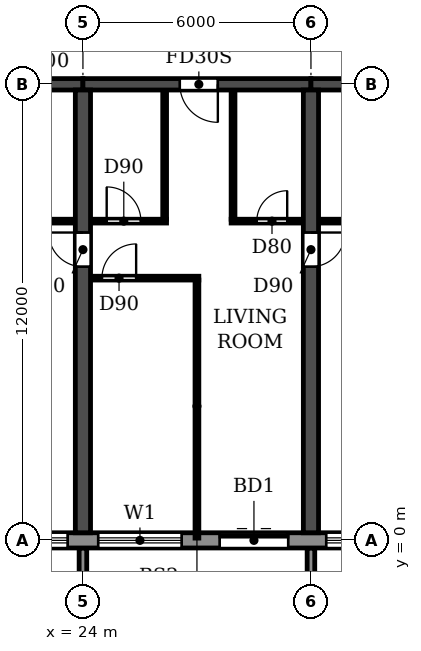
"""IFC4 building model, lengths in metres.
Left out: names, types, materials, properties, quantities, classifications, styles, units other than length and angle.
Written with IfcOpenShell. Run it as: python <this file> out.ifc"""

import sys

from ifc_helpers import new_model, si_unit, direction, frame, frame_2d, origin, place, context, subcontext, project, spatial, polyline, rectangle, outline, extrude, source, transform, mapped, element, fill, save


model = new_model("IFC4")
c1 = context("Model", 3, precision=1e-05, world=origin(), true_north=direction((0.0, 1.0)))
c2 = subcontext(c1, "Body", "Model", "MODEL_VIEW")
j1 = project(units=[si_unit("LENGTHUNIT", "METRE"), si_unit("PLANEANGLEUNIT", "RADIAN")], contexts=[c1])
p1 = place(None, origin())
s1 = spatial("IfcSite", under=j1, at=p1, CompositionType="ELEMENT")
p2 = place(p1, origin())
s2 = spatial("IfcBuilding", under=s1, at=p2, CompositionType="ELEMENT")
p3 = place(p2, frame((0.0, 0.0, 63.0)))
s3 = spatial("IfcBuildingStorey", under=s2, at=p3, CompositionType="ELEMENT", Elevation=63.0)
p4 = place(p3, frame((24.0, 0.2, 0.0), z_axis=(0.0, 0.0, 1.0), x_axis=(0.0, 1.0, 0.0)))
e1 = element("IfcWall", 1, at=p4, inside=s3, PredefinedType="SHEAR", context=c2, shape_type="SweptSolid", body=[
    extrude(rectangle(XDim=11.65, YDim=0.4, at=frame_2d((5.825, 0.0))), origin(), (0.0, 0.0, 1.0), 2.95),
])
p5 = place(p4, frame((7.0, 0.0, 0.0)))
e2 = element("IfcOpeningElement", 2, at=p5, cuts=e1, PredefinedType="OPENING", context=c2, shape_type="SweptSolid", body=[
    extrude(rectangle(XDim=0.9, YDim=2.1, at=frame_2d((0.45, 1.05))), frame((0.0, 0.21, 0.0), z_axis=(0.0, -1.0, 0.0), x_axis=(1.0, 0.0, 0.0)), (0.0, 0.0, 1.0), 0.42),
])
p6 = place(p3, frame((30.0, 0.2, 0.0), z_axis=(0.0, 0.0, 1.0), x_axis=(0.0, 1.0, 0.0)))
e3 = element("IfcWall", 3, at=p6, inside=s3, PredefinedType="SHEAR", context=c2, shape_type="SweptSolid", body=[
    extrude(rectangle(XDim=11.65, YDim=0.4, at=frame_2d((5.825, 0.0))), origin(), (0.0, 0.0, 1.0), 2.95),
])
p7 = place(p6, frame((7.0, 0.0, 0.0)))
e4 = element("IfcOpeningElement", 4, at=p7, cuts=e3, PredefinedType="OPENING", context=c2, shape_type="SweptSolid", body=[
    extrude(rectangle(XDim=0.9, YDim=2.1, at=frame_2d((0.45, 1.05))), frame((0.0, 0.21, 0.0), z_axis=(0.0, -1.0, 0.0), x_axis=(1.0, 0.0, 0.0)), (0.0, 0.0, 1.0), 0.42),
])
p8 = place(p3, frame((18.0, 12.0, 0.0), z_axis=(0.0, 0.0, 1.0), x_axis=(1.0, 0.0, 0.0)))
e5 = element("IfcWall", 5, at=p8, inside=s3, PredefinedType="SHEAR", context=c2, shape_type="SweptSolid", body=[
    extrude(rectangle(XDim=6.0, YDim=0.3, at=frame_2d((3.0, 0.0))), origin(), (0.0, 0.0, 1.0), 2.35),
])
p9 = place(p3, frame((24.0, 12.0, 0.0), z_axis=(0.0, 0.0, 1.0), x_axis=(1.0, 0.0, 0.0)))
e6 = element("IfcWall", 6, at=p9, inside=s3, PredefinedType="SHEAR", context=c2, shape_type="SweptSolid", body=[
    extrude(rectangle(XDim=6.0, YDim=0.3, at=frame_2d((3.0, 0.0))), origin(), (0.0, 0.0, 1.0), 2.35),
])
p10 = place(p9, frame((2.55, 0.0, 0.0)))
e7 = element("IfcOpeningElement", 7, at=p10, cuts=e6, PredefinedType="OPENING", context=c2, shape_type="SweptSolid", body=[
    extrude(rectangle(XDim=1.0, YDim=2.1, at=frame_2d((0.5, 1.05))), frame((0.0, 0.16, 0.0), z_axis=(0.0, -1.0, 0.0), x_axis=(1.0, 0.0, 0.0)), (0.0, 0.0, 1.0), 0.32),
])
p11 = place(p3, frame((30.0, 12.0, 0.0), z_axis=(0.0, 0.0, 1.0), x_axis=(1.0, 0.0, 0.0)))
e8 = element("IfcWall", 8, at=p11, inside=s3, PredefinedType="SHEAR", context=c2, shape_type="SweptSolid", body=[
    extrude(rectangle(XDim=6.0, YDim=0.3, at=frame_2d((3.0, 0.0))), origin(), (0.0, 0.0, 1.0), 2.35),
])
p12 = place(p3, frame((10.683, 0.0, 0.0), z_axis=(0.0, 0.0, 1.0), x_axis=(1.0, 0.0, 0.0)))
e9 = element("IfcWall", 9, at=p12, inside=s3, PredefinedType="STANDARD", context=c2, shape_type="SweptSolid", body=[
    extrude(rectangle(XDim=80.634, YDim=0.4, at=frame_2d((40.317, 0.0))), origin(), (0.0, 0.0, 1.0), 2.95),
])
p13 = place(p12, frame((1.717, 0.0, 0.9)))
e10 = element("IfcOpeningElement", 10, at=p13, cuts=e9, PredefinedType="OPENING", context=c2, shape_type="SweptSolid", body=[
    extrude(rectangle(XDim=2.2, YDim=1.5, at=frame_2d((1.1, 0.75))), frame((0.0, 0.21, 0.0), z_axis=(0.0, -1.0, 0.0), x_axis=(1.0, 0.0, 0.0)), (0.0, 0.0, 1.0), 0.42),
])
p14 = place(p12, frame((4.917, 0.0, 0.0)))
e11 = element("IfcOpeningElement", 11, at=p14, cuts=e9, PredefinedType="OPENING", context=c2, shape_type="SweptSolid", body=[
    extrude(rectangle(XDim=1.8, YDim=2.4, at=frame_2d((0.9, 1.2))), frame((0.0, 0.21, 0.0), z_axis=(0.0, -1.0, 0.0), x_axis=(1.0, 0.0, 0.0)), (0.0, 0.0, 1.0), 0.42),
])
p15 = place(p12, frame((7.717, 0.0, 0.9)))
e12 = element("IfcOpeningElement", 12, at=p15, cuts=e9, PredefinedType="OPENING", context=c2, shape_type="SweptSolid", body=[
    extrude(rectangle(XDim=2.2, YDim=1.5, at=frame_2d((1.1, 0.75))), frame((0.0, 0.21, 0.0), z_axis=(0.0, -1.0, 0.0), x_axis=(1.0, 0.0, 0.0)), (0.0, 0.0, 1.0), 0.42),
])
p16 = place(p12, frame((10.717, 0.0, 0.9)))
e13 = element("IfcOpeningElement", 13, at=p16, cuts=e9, PredefinedType="OPENING", context=c2, shape_type="SweptSolid", body=[
    extrude(rectangle(XDim=2.2, YDim=1.5, at=frame_2d((1.1, 0.75))), frame((0.0, 0.21, 0.0), z_axis=(0.0, -1.0, 0.0), x_axis=(1.0, 0.0, 0.0)), (0.0, 0.0, 1.0), 0.42),
])
p17 = place(p12, frame((13.717, 0.0, 0.9)))
e14 = element("IfcOpeningElement", 14, at=p17, cuts=e9, PredefinedType="OPENING", context=c2, shape_type="SweptSolid", body=[
    extrude(rectangle(XDim=2.2, YDim=1.5, at=frame_2d((1.1, 0.75))), frame((0.0, 0.21, 0.0), z_axis=(0.0, -1.0, 0.0), x_axis=(1.0, 0.0, 0.0)), (0.0, 0.0, 1.0), 0.42),
])
p18 = place(p12, frame((16.917, 0.0, 0.0)))
e15 = element("IfcOpeningElement", 15, at=p18, cuts=e9, PredefinedType="OPENING", context=c2, shape_type="SweptSolid", body=[
    extrude(rectangle(XDim=1.8, YDim=2.4, at=frame_2d((0.9, 1.2))), frame((0.0, 0.21, 0.0), z_axis=(0.0, -1.0, 0.0), x_axis=(1.0, 0.0, 0.0)), (0.0, 0.0, 1.0), 0.42),
])
p19 = place(p12, frame((19.717, 0.0, 0.9)))
e16 = element("IfcOpeningElement", 16, at=p19, cuts=e9, PredefinedType="OPENING", context=c2, shape_type="SweptSolid", body=[
    extrude(rectangle(XDim=2.2, YDim=1.5, at=frame_2d((1.1, 0.75))), frame((0.0, 0.21, 0.0), z_axis=(0.0, -1.0, 0.0), x_axis=(1.0, 0.0, 0.0)), (0.0, 0.0, 1.0), 0.42),
])
p20 = place(p12, frame((22.717, 0.0, 0.9)))
e17 = element("IfcOpeningElement", 17, at=p20, cuts=e9, PredefinedType="OPENING", context=c2, shape_type="SweptSolid", body=[
    extrude(rectangle(XDim=2.2, YDim=1.5, at=frame_2d((1.1, 0.75))), frame((0.0, 0.21, 0.0), z_axis=(0.0, -1.0, 0.0), x_axis=(1.0, 0.0, 0.0)), (0.0, 0.0, 1.0), 0.42),
])
p21 = place(p12, frame((25.917, 0.0, 0.0)))
e18 = element("IfcOpeningElement", 18, at=p21, cuts=e9, PredefinedType="OPENING", context=c2, shape_type="SweptSolid", body=[
    extrude(rectangle(XDim=1.8, YDim=2.4, at=frame_2d((0.9, 1.2))), frame((0.0, 0.21, 0.0), z_axis=(0.0, -1.0, 0.0), x_axis=(1.0, 0.0, 0.0)), (0.0, 0.0, 1.0), 0.42),
])
p22 = place(p12, frame((28.717, 0.0, 0.9)))
e19 = element("IfcOpeningElement", 19, at=p22, cuts=e9, PredefinedType="OPENING", context=c2, shape_type="SweptSolid", body=[
    extrude(rectangle(XDim=2.2, YDim=1.5, at=frame_2d((1.1, 0.75))), frame((0.0, 0.21, 0.0), z_axis=(0.0, -1.0, 0.0), x_axis=(1.0, 0.0, 0.0)), (0.0, 0.0, 1.0), 0.42),
])
p23 = place(p12, frame((31.717, 0.0, 0.9)))
e20 = element("IfcOpeningElement", 20, at=p23, cuts=e9, PredefinedType="OPENING", context=c2, shape_type="SweptSolid", body=[
    extrude(rectangle(XDim=2.2, YDim=1.5, at=frame_2d((1.1, 0.75))), frame((0.0, 0.21, 0.0), z_axis=(0.0, -1.0, 0.0), x_axis=(1.0, 0.0, 0.0)), (0.0, 0.0, 1.0), 0.42),
])
p24 = place(p12, frame((34.717, 0.0, 0.9)))
e21 = element("IfcOpeningElement", 21, at=p24, cuts=e9, PredefinedType="OPENING", context=c2, shape_type="SweptSolid", body=[
    extrude(rectangle(XDim=2.2, YDim=1.5, at=frame_2d((1.1, 0.75))), frame((0.0, 0.21, 0.0), z_axis=(0.0, -1.0, 0.0), x_axis=(1.0, 0.0, 0.0)), (0.0, 0.0, 1.0), 0.42),
])
p25 = place(p12, frame((37.717, 0.0, 0.9)))
e22 = element("IfcOpeningElement", 22, at=p25, cuts=e9, PredefinedType="OPENING", context=c2, shape_type="SweptSolid", body=[
    extrude(rectangle(XDim=2.2, YDim=1.5, at=frame_2d((1.1, 0.75))), frame((0.0, 0.21, 0.0), z_axis=(0.0, -1.0, 0.0), x_axis=(1.0, 0.0, 0.0)), (0.0, 0.0, 1.0), 0.42),
])
p26 = place(p12, frame((40.917, 0.0, 0.0)))
e23 = element("IfcOpeningElement", 23, at=p26, cuts=e9, PredefinedType="OPENING", context=c2, shape_type="SweptSolid", body=[
    extrude(rectangle(XDim=1.8, YDim=2.4, at=frame_2d((0.9, 1.2))), frame((0.0, 0.21, 0.0), z_axis=(0.0, -1.0, 0.0), x_axis=(1.0, 0.0, 0.0)), (0.0, 0.0, 1.0), 0.42),
])
p27 = place(p12, frame((43.717, 0.0, 0.9)))
e24 = element("IfcOpeningElement", 24, at=p27, cuts=e9, PredefinedType="OPENING", context=c2, shape_type="SweptSolid", body=[
    extrude(rectangle(XDim=2.2, YDim=1.5, at=frame_2d((1.1, 0.75))), frame((0.0, 0.21, 0.0), z_axis=(0.0, -1.0, 0.0), x_axis=(1.0, 0.0, 0.0)), (0.0, 0.0, 1.0), 0.42),
])
p28 = place(p12, frame((46.717, 0.0, 0.9)))
e25 = element("IfcOpeningElement", 25, at=p28, cuts=e9, PredefinedType="OPENING", context=c2, shape_type="SweptSolid", body=[
    extrude(rectangle(XDim=2.2, YDim=1.5, at=frame_2d((1.1, 0.75))), frame((0.0, 0.21, 0.0), z_axis=(0.0, -1.0, 0.0), x_axis=(1.0, 0.0, 0.0)), (0.0, 0.0, 1.0), 0.42),
])
p29 = place(p12, frame((49.717, 0.0, 0.9)))
e26 = element("IfcOpeningElement", 26, at=p29, cuts=e9, PredefinedType="OPENING", context=c2, shape_type="SweptSolid", body=[
    extrude(rectangle(XDim=2.2, YDim=1.5, at=frame_2d((1.1, 0.75))), frame((0.0, 0.21, 0.0), z_axis=(0.0, -1.0, 0.0), x_axis=(1.0, 0.0, 0.0)), (0.0, 0.0, 1.0), 0.42),
])
p30 = place(p12, frame((52.717, 0.0, 0.9)))
e27 = element("IfcOpeningElement", 27, at=p30, cuts=e9, PredefinedType="OPENING", context=c2, shape_type="SweptSolid", body=[
    extrude(rectangle(XDim=2.2, YDim=1.5, at=frame_2d((1.1, 0.75))), frame((0.0, 0.21, 0.0), z_axis=(0.0, -1.0, 0.0), x_axis=(1.0, 0.0, 0.0)), (0.0, 0.0, 1.0), 0.42),
])
p31 = place(p12, frame((55.717, 0.0, 0.9)))
e28 = element("IfcOpeningElement", 28, at=p31, cuts=e9, PredefinedType="OPENING", context=c2, shape_type="SweptSolid", body=[
    extrude(rectangle(XDim=2.2, YDim=1.5, at=frame_2d((1.1, 0.75))), frame((0.0, 0.21, 0.0), z_axis=(0.0, -1.0, 0.0), x_axis=(1.0, 0.0, 0.0)), (0.0, 0.0, 1.0), 0.42),
])
p32 = place(p12, frame((58.717, 0.0, 0.9)))
e29 = element("IfcOpeningElement", 29, at=p32, cuts=e9, PredefinedType="OPENING", context=c2, shape_type="SweptSolid", body=[
    extrude(rectangle(XDim=2.2, YDim=1.5, at=frame_2d((1.1, 0.75))), frame((0.0, 0.21, 0.0), z_axis=(0.0, -1.0, 0.0), x_axis=(1.0, 0.0, 0.0)), (0.0, 0.0, 1.0), 0.42),
])
p33 = place(p12, frame((61.717, 0.0, 0.9)))
e30 = element("IfcOpeningElement", 30, at=p33, cuts=e9, PredefinedType="OPENING", context=c2, shape_type="SweptSolid", body=[
    extrude(rectangle(XDim=2.2, YDim=1.5, at=frame_2d((1.1, 0.75))), frame((0.0, 0.21, 0.0), z_axis=(0.0, -1.0, 0.0), x_axis=(1.0, 0.0, 0.0)), (0.0, 0.0, 1.0), 0.42),
])
p34 = place(p12, frame((64.917, 0.0, 0.0)))
e31 = element("IfcOpeningElement", 31, at=p34, cuts=e9, PredefinedType="OPENING", context=c2, shape_type="SweptSolid", body=[
    extrude(rectangle(XDim=1.8, YDim=2.4, at=frame_2d((0.9, 1.2))), frame((0.0, 0.21, 0.0), z_axis=(0.0, -1.0, 0.0), x_axis=(1.0, 0.0, 0.0)), (0.0, 0.0, 1.0), 0.42),
])
p35 = place(p12, frame((67.717, 0.0, 0.9)))
e32 = element("IfcOpeningElement", 32, at=p35, cuts=e9, PredefinedType="OPENING", context=c2, shape_type="SweptSolid", body=[
    extrude(rectangle(XDim=2.2, YDim=1.5, at=frame_2d((1.1, 0.75))), frame((0.0, 0.21, 0.0), z_axis=(0.0, -1.0, 0.0), x_axis=(1.0, 0.0, 0.0)), (0.0, 0.0, 1.0), 0.42),
])
p36 = place(p12, frame((70.717, 0.0, 0.9)))
e33 = element("IfcOpeningElement", 33, at=p36, cuts=e9, PredefinedType="OPENING", context=c2, shape_type="SweptSolid", body=[
    extrude(rectangle(XDim=2.2, YDim=1.5, at=frame_2d((1.1, 0.75))), frame((0.0, 0.21, 0.0), z_axis=(0.0, -1.0, 0.0), x_axis=(1.0, 0.0, 0.0)), (0.0, 0.0, 1.0), 0.42),
])
p37 = place(p12, frame((73.717, 0.0, 0.9)))
e34 = element("IfcOpeningElement", 34, at=p37, cuts=e9, PredefinedType="OPENING", context=c2, shape_type="SweptSolid", body=[
    extrude(rectangle(XDim=2.2, YDim=1.5, at=frame_2d((1.1, 0.75))), frame((0.0, 0.21, 0.0), z_axis=(0.0, -1.0, 0.0), x_axis=(1.0, 0.0, 0.0)), (0.0, 0.0, 1.0), 0.42),
])
p38 = place(p12, frame((76.917, 0.0, 0.0)))
e35 = element("IfcOpeningElement", 35, at=p38, cuts=e9, PredefinedType="OPENING", context=c2, shape_type="SweptSolid", body=[
    extrude(rectangle(XDim=1.8, YDim=2.4, at=frame_2d((0.9, 1.2))), frame((0.0, 0.21, 0.0), z_axis=(0.0, -1.0, 0.0), x_axis=(1.0, 0.0, 0.0)), (0.0, 0.0, 1.0), 0.42),
])
m1 = source(origin(), c2, "Body", "SweptSolid", [
    extrude(outline(polyline([(0.0, 0.0), (0.2, 0.0), (0.2, 1.65), (0.0, 1.65), (0.0, 0.0)])), origin(), (0.0, 0.0, 1.0), 3.1),
])
for number, where in (
    (36, (23.9, -1.85, 0.0)),
    (37, (29.9, -1.85, 0.0)),
):
    element("IfcWall", number, at=place(p3, frame(where)), inside=s3, PredefinedType="STANDARD", context=c2, shape_type="MappedRepresentation", body=[
        mapped(m1, transform((0.0, 0.0, 0.0))),
    ])
p39 = place(p3, frame((24.21, 6.9, 0.0), z_axis=(0.0, 0.0, 1.0), x_axis=(1.0, 0.0, 0.0)))
e38 = element("IfcWall", 38, at=p39, inside=s3, PredefinedType="PARTITIONING", context=c2, shape_type="SweptSolid", body=[
    extrude(rectangle(XDim=2.84, YDim=0.1, at=frame_2d((1.42, 0.0))), origin(), (0.0, 0.0, 1.0), 2.95),
])
p40 = place(p39, frame((0.29, 0.0, 0.0)))
e39 = element("IfcOpeningElement", 39, at=p40, cuts=e38, PredefinedType="OPENING", context=c2, shape_type="SweptSolid", body=[
    extrude(rectangle(XDim=0.9, YDim=2.1, at=frame_2d((0.45, 1.05))), frame((0.0, 0.06, 0.0), z_axis=(0.0, -1.0, 0.0), x_axis=(1.0, 0.0, 0.0)), (0.0, 0.0, 1.0), 0.12),
])
p41 = place(p3, frame((18.21, 8.4, 0.0), z_axis=(0.0, 0.0, 1.0), x_axis=(1.0, 0.0, 0.0)))
e40 = element("IfcWall", 40, at=p41, inside=s3, PredefinedType="PARTITIONING", context=c2, shape_type="SweptSolid", body=[
    extrude(rectangle(XDim=5.58, YDim=0.1, at=frame_2d((2.79, 0.0))), origin(), (0.0, 0.0, 1.0), 2.95),
])
p42 = place(p41, frame((0.89, 0.0, 0.0)))
e41 = element("IfcOpeningElement", 41, at=p42, cuts=e40, PredefinedType="OPENING", context=c2, shape_type="SweptSolid", body=[
    extrude(rectangle(XDim=0.8, YDim=2.1, at=frame_2d((0.4, 1.05))), frame((0.0, 0.06, 0.0), z_axis=(0.0, -1.0, 0.0), x_axis=(1.0, 0.0, 0.0)), (0.0, 0.0, 1.0), 0.12),
])
p43 = place(p41, frame((3.89, 0.0, 0.0)))
e42 = element("IfcOpeningElement", 42, at=p43, cuts=e40, PredefinedType="OPENING", context=c2, shape_type="SweptSolid", body=[
    extrude(rectangle(XDim=0.8, YDim=2.1, at=frame_2d((0.4, 1.05))), frame((0.0, 0.06, 0.0), z_axis=(0.0, -1.0, 0.0), x_axis=(1.0, 0.0, 0.0)), (0.0, 0.0, 1.0), 0.12),
])
p44 = place(p3, frame((24.21, 8.4, 0.0), z_axis=(0.0, 0.0, 1.0), x_axis=(1.0, 0.0, 0.0)))
e43 = element("IfcWall", 43, at=p44, inside=s3, PredefinedType="PARTITIONING", context=c2, shape_type="SweptSolid", body=[
    extrude(rectangle(XDim=1.99, YDim=0.1, at=frame_2d((0.995, 0.0))), origin(), (0.0, 0.0, 1.0), 2.95),
])
p45 = place(p44, frame((0.415, 0.0, 0.0)))
e44 = element("IfcOpeningElement", 44, at=p45, cuts=e43, PredefinedType="OPENING", context=c2, shape_type="SweptSolid", body=[
    extrude(rectangle(XDim=0.9, YDim=2.1, at=frame_2d((0.45, 1.05))), frame((0.0, 0.06, 0.0), z_axis=(0.0, -1.0, 0.0), x_axis=(1.0, 0.0, 0.0)), (0.0, 0.0, 1.0), 0.12),
])
p46 = place(p3, frame((27.9, 8.4, 0.0), z_axis=(0.0, 0.0, 1.0), x_axis=(1.0, 0.0, 0.0)))
e45 = element("IfcWall", 45, at=p46, inside=s3, PredefinedType="PARTITIONING", context=c2, shape_type="SweptSolid", body=[
    extrude(rectangle(XDim=1.89, YDim=0.1, at=frame_2d((0.945, 0.0))), origin(), (0.0, 0.0, 1.0), 2.95),
])
p47 = place(p46, frame((0.675, 0.0, 0.0)))
e46 = element("IfcOpeningElement", 46, at=p47, cuts=e45, PredefinedType="OPENING", context=c2, shape_type="SweptSolid", body=[
    extrude(rectangle(XDim=0.8, YDim=2.1, at=frame_2d((0.4, 1.05))), frame((0.0, 0.06, 0.0), z_axis=(0.0, -1.0, 0.0), x_axis=(1.0, 0.0, 0.0)), (0.0, 0.0, 1.0), 0.12),
])
p48 = place(p3, frame((30.21, 8.4, 0.0), z_axis=(0.0, 0.0, 1.0), x_axis=(1.0, 0.0, 0.0)))
e47 = element("IfcWall", 47, at=p48, inside=s3, PredefinedType="PARTITIONING", context=c2, shape_type="SweptSolid", body=[
    extrude(rectangle(XDim=2.69, YDim=0.1, at=frame_2d((1.345, 0.0))), origin(), (0.0, 0.0, 1.0), 2.95),
])
p49 = place(p48, frame((0.89, 0.0, 0.0)))
e48 = element("IfcOpeningElement", 48, at=p49, cuts=e47, PredefinedType="OPENING", context=c2, shape_type="SweptSolid", body=[
    extrude(rectangle(XDim=0.8, YDim=2.1, at=frame_2d((0.4, 1.05))), frame((0.0, 0.06, 0.0), z_axis=(0.0, -1.0, 0.0), x_axis=(1.0, 0.0, 0.0)), (0.0, 0.0, 1.0), 0.12),
])
p50 = place(p3, frame((26.15, 8.45, 0.0), z_axis=(0.0, 0.0, 1.0), x_axis=(0.0, 1.0, 0.0)))
e49 = element("IfcWall", 49, at=p50, inside=s3, PredefinedType="PARTITIONING", context=c2, shape_type="SweptSolid", body=[
    extrude(rectangle(XDim=3.39, YDim=0.1, at=frame_2d((1.695, 0.0))), origin(), (0.0, 0.0, 1.0), 2.95),
])
p51 = place(p3, frame((27.0, 0.06, 0.0), z_axis=(0.0, 0.0, 1.0), x_axis=(0.0, 1.0, 0.0)))
e50 = element("IfcWall", 50, at=p51, inside=s3, PredefinedType="PARTITIONING", context=c2, shape_type="SweptSolid", body=[
    extrude(rectangle(XDim=6.79, YDim=0.1, at=frame_2d((3.395, 0.0))), origin(), (0.0, 0.0, 1.0), 2.95),
])
p52 = place(p3, frame((27.95, 8.45, 0.0), z_axis=(0.0, 0.0, 1.0), x_axis=(0.0, 1.0, 0.0)))
e51 = element("IfcWall", 51, at=p52, inside=s3, PredefinedType="PARTITIONING", context=c2, shape_type="SweptSolid", body=[
    extrude(rectangle(XDim=3.39, YDim=0.1, at=frame_2d((1.695, 0.0))), origin(), (0.0, 0.0, 1.0), 2.95),
])
p53 = place(p16, origin())
e52 = element("IfcWindow", 52, at=p53, inside=s3, PartitioningType="DOUBLE_PANEL_HORIZONTAL", PredefinedType="WINDOW", context=c2, shape_type="SweptSolid", body=[
    extrude(rectangle(XDim=2.2, YDim=1.5, at=frame_2d((1.1, 0.75))), frame((0.0, 0.03, 0.0), z_axis=(0.0, -1.0, 0.0), x_axis=(1.0, 0.0, 0.0)), (0.0, 0.0, 1.0), 0.06),
])
fill(e13, e52)
p54 = place(p17, origin())
e53 = element("IfcWindow", 53, at=p54, inside=s3, PartitioningType="DOUBLE_PANEL_HORIZONTAL", PredefinedType="WINDOW", context=c2, shape_type="SweptSolid", body=[
    extrude(rectangle(XDim=2.2, YDim=1.5, at=frame_2d((1.1, 0.75))), frame((0.0, 0.03, 0.0), z_axis=(0.0, -1.0, 0.0), x_axis=(1.0, 0.0, 0.0)), (0.0, 0.0, 1.0), 0.06),
])
fill(e14, e53)
p55 = place(p18, origin())
e54 = element("IfcDoor", 54, at=p55, inside=s3, OperationType="DOUBLE_DOOR_SLIDING", PredefinedType="DOOR", context=c2, shape_type="SweptSolid", body=[
    extrude(rectangle(XDim=1.8, YDim=2.4, at=frame_2d((0.9, 1.2))), frame((0.0, 0.025, 0.0), z_axis=(0.0, -1.0, 0.0), x_axis=(1.0, 0.0, 0.0)), (0.0, 0.0, 1.0), 0.05),
])
fill(e15, e54)
p56 = place(p19, origin())
e55 = element("IfcWindow", 55, at=p56, inside=s3, PartitioningType="DOUBLE_PANEL_HORIZONTAL", PredefinedType="WINDOW", context=c2, shape_type="SweptSolid", body=[
    extrude(rectangle(XDim=2.2, YDim=1.5, at=frame_2d((1.1, 0.75))), frame((0.0, 0.03, 0.0), z_axis=(0.0, -1.0, 0.0), x_axis=(1.0, 0.0, 0.0)), (0.0, 0.0, 1.0), 0.06),
])
fill(e16, e55)
p57 = place(p5, origin())
e56 = element("IfcDoor", 56, at=p57, inside=s3, OperationType="SINGLE_SWING_RIGHT", PredefinedType="DOOR", context=c2, shape_type="SweptSolid", body=[
    extrude(rectangle(XDim=0.9, YDim=2.1, at=frame_2d((0.45, 1.05))), frame((0.0, 0.025, 0.0), z_axis=(0.0, -1.0, 0.0), x_axis=(1.0, 0.0, 0.0)), (0.0, 0.0, 1.0), 0.05),
])
fill(e2, e56)
p58 = place(p40, origin())
e57 = element("IfcDoor", 57, at=p58, inside=s3, OperationType="SINGLE_SWING_RIGHT", PredefinedType="DOOR", context=c2, shape_type="SweptSolid", body=[
    extrude(rectangle(XDim=0.9, YDim=2.1, at=frame_2d((0.45, 1.05))), frame((0.0, 0.025, 0.0), z_axis=(0.0, -1.0, 0.0), x_axis=(1.0, 0.0, 0.0)), (0.0, 0.0, 1.0), 0.05),
])
fill(e39, e57)
p59 = place(p45, origin())
e58 = element("IfcDoor", 58, at=p59, inside=s3, OperationType="SINGLE_SWING_LEFT", PredefinedType="DOOR", context=c2, shape_type="SweptSolid", body=[
    extrude(rectangle(XDim=0.9, YDim=2.1, at=frame_2d((0.45, 1.05))), frame((0.0, 0.025, 0.0), z_axis=(0.0, -1.0, 0.0), x_axis=(1.0, 0.0, 0.0)), (0.0, 0.0, 1.0), 0.05),
])
fill(e44, e58)
p60 = place(p10, frame((1.0, 0.0, 0.0), z_axis=(0.0, 0.0, 1.0), x_axis=(-1.0, 0.0, 0.0)))
e59 = element("IfcDoor", 59, at=p60, inside=s3, OperationType="SINGLE_SWING_LEFT", PredefinedType="DOOR", context=c2, shape_type="SweptSolid", body=[
    extrude(rectangle(XDim=1.0, YDim=2.1, at=frame_2d((0.5, 1.05))), frame((0.0, 0.025, 0.0), z_axis=(0.0, -1.0, 0.0), x_axis=(1.0, 0.0, 0.0)), (0.0, 0.0, 1.0), 0.05),
])
fill(e7, e59)
p61 = place(p47, origin())
e60 = element("IfcDoor", 60, at=p61, inside=s3, OperationType="SINGLE_SWING_RIGHT", PredefinedType="DOOR", context=c2, shape_type="SweptSolid", body=[
    extrude(rectangle(XDim=0.8, YDim=2.1, at=frame_2d((0.4, 1.05))), frame((0.0, 0.025, 0.0), z_axis=(0.0, -1.0, 0.0), x_axis=(1.0, 0.0, 0.0)), (0.0, 0.0, 1.0), 0.05),
])
fill(e46, e60)
p62 = place(p7, frame((0.9, 0.0, 0.0), z_axis=(0.0, 0.0, 1.0), x_axis=(-1.0, 0.0, 0.0)))
e61 = element("IfcDoor", 61, at=p62, inside=s3, OperationType="SINGLE_SWING_LEFT", PredefinedType="DOOR", context=c2, shape_type="SweptSolid", body=[
    extrude(rectangle(XDim=0.9, YDim=2.1, at=frame_2d((0.45, 1.05))), frame((0.0, 0.025, 0.0), z_axis=(0.0, -1.0, 0.0), x_axis=(1.0, 0.0, 0.0)), (0.0, 0.0, 1.0), 0.05),
])
fill(e4, e61)
save(model, sys.argv[1])
